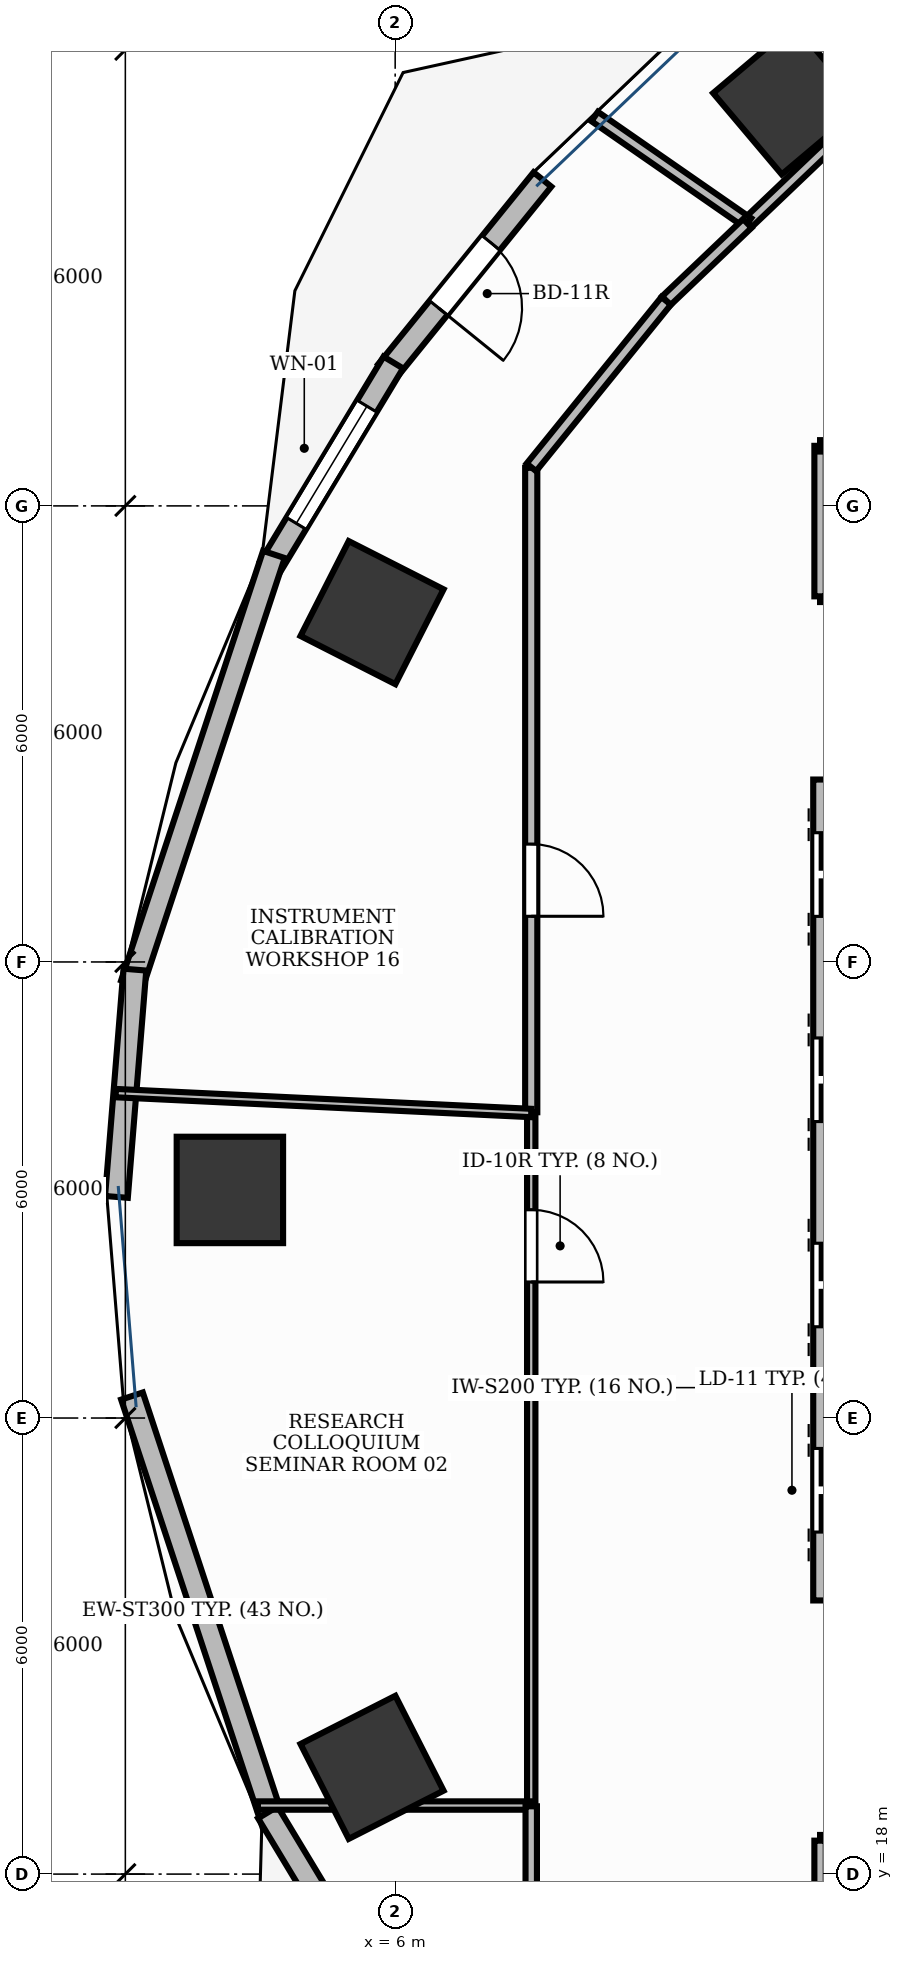
"""IFC4 building model, lengths in metres.
Left out: names, types, materials, properties, quantities, classifications, styles, units other than length and angle.
Written with IfcOpenShell. Run it as: python <this file> out.ifc"""

import sys

from ifc_helpers import new_model, si_unit, direction, frame, frame_2d, origin, origin_2d, place, context, subcontext, project, spatial, rectangle, extrude, element, fill, save


model = new_model("IFC4")
c1 = context("Model", 3, precision=1e-05, world=origin(), true_north=direction((0.0, 1.0)))
c2 = subcontext(c1, "Body", "Model", "MODEL_VIEW")
j1 = project(units=[si_unit("LENGTHUNIT", "METRE"), si_unit("PLANEANGLEUNIT", "RADIAN")], contexts=[c1])
p1 = place(None, origin())
s1 = spatial("IfcSite", under=j1, at=p1, CompositionType="ELEMENT")
p2 = place(p1, origin())
s2 = spatial("IfcBuilding", under=s1, at=p2, CompositionType="ELEMENT")
p3 = place(p2, frame((0.0, 0.0, 30.0)))
s3 = spatial("IfcBuildingStorey", under=s2, at=p3, CompositionType="ELEMENT", Elevation=30.0)
for number, where, z_axis, x_axis in (
    (1, (11.17, 41.347, -0.0), (0.0, 0.0, 1.0), (0.764, 0.645, 0.0)),
    (2, (5.696, 34.596, -0.0), (0.0, 0.0, 1.0), (0.453, 0.891, 0.0)),
    (3, (3.825, 27.001, -0.0), (0.0, 0.0, 1.0), (0.0, 1.0, 0.0)),
    (4, (5.696, 19.404, -0.0), (0.0, 0.0, 1.0), (-0.453, 0.891, 0.0)),
):
    element("IfcColumn", number, at=place(p3, frame(where, z_axis=z_axis, x_axis=x_axis)), inside=s3, PredefinedType="COLUMN", context=c2, shape_type="SweptSolid", body=[
        extrude(rectangle(XDim=1.4, YDim=1.4, at=origin_2d()), origin(), (0.0, 0.0, 1.0), 3.901),
    ])
p4 = place(p3, frame((7.938, 40.294, 0.0), z_axis=(0.0, 0.0, 1.0), x_axis=(-0.629295540187, -0.777166084631, 0.0)))
e5 = element("IfcWall", 5, at=p4, inside=s3, PredefinedType="STANDARD", context=c2, shape_type="SweptSolid", body=[
    extrude(rectangle(XDim=3.248, YDim=0.3, at=frame_2d((1.624, 0.0))), origin(), (0.0, 0.0, 1.0), 3.9),
])
p5 = place(p4, frame((1.074, 0.0, 0.0)))
e6 = element("IfcOpeningElement", 6, at=p5, cuts=e5, PredefinedType="OPENING", context=c2, shape_type="SweptSolid", body=[
    extrude(rectangle(XDim=1.1, YDim=2.15, at=frame_2d((0.55, 1.075))), frame((0.0, 0.165, 0.0), z_axis=(0.0, -1.0, 0.0), x_axis=(1.0, 0.0, 0.0)), (0.0, 0.0, 1.0), 0.33),
])
p6 = place(p3, frame((5.975, 37.886, 0.0), z_axis=(0.0, 0.0, 1.0), x_axis=(-0.516447962267, -0.856318575222, 0.0)))
e7 = element("IfcWall", 7, at=p6, inside=s3, PredefinedType="STANDARD", context=c2, shape_type="SweptSolid", body=[
    extrude(rectangle(XDim=3.143, YDim=0.3, at=frame_2d((1.571, 0.0))), origin(), (0.0, 0.0, 1.0), 3.9),
])
p7 = place(p6, frame((0.671, 0.0, 0.9)))
e8 = element("IfcOpeningElement", 8, at=p7, cuts=e7, PredefinedType="OPENING", context=c2, shape_type="SweptSolid", body=[
    extrude(rectangle(XDim=1.8, YDim=2.1, at=frame_2d((0.9, 1.05))), frame((0.0, 0.165, 0.0), z_axis=(0.0, -1.0, 0.0), x_axis=(1.0, 0.0, 0.0)), (0.0, 0.0, 1.0), 0.33),
])
p8 = place(p3, frame((4.404, 35.361, 0.0), z_axis=(0.0, 0.0, 1.0), x_axis=(-0.31372816724, -0.949512841978, 0.0)))
e9 = element("IfcWall", 9, at=p8, inside=s3, PredefinedType="STANDARD", context=c2, shape_type="SweptSolid", body=[
    extrude(rectangle(XDim=5.951, YDim=0.3, at=frame_2d((2.976, 0.0))), origin(), (0.0, 0.0, 1.0), 3.47),
])
p9 = place(p3, frame((2.576, 29.899, 0.0), z_axis=(0.0, 0.0, 1.0), x_axis=(-0.080890160317, -0.996723021689, 0.0)))
e10 = element("IfcWall", 10, at=p9, inside=s3, PredefinedType="STANDARD", context=c2, shape_type="SweptSolid", body=[
    extrude(rectangle(XDim=3.0, YDim=0.3, at=frame_2d((1.5, 0.0))), origin(), (0.0, 0.0, 1.0), 3.47),
])
p10 = place(p3, frame((2.537, 24.289, 0.0), z_axis=(0.0, 0.0, 1.0), x_axis=(0.31372816724, -0.949512841978, 0.0)))
e11 = element("IfcWall", 11, at=p10, inside=s3, PredefinedType="STANDARD", context=c2, shape_type="SweptSolid", body=[
    extrude(rectangle(XDim=5.951, YDim=0.3, at=frame_2d((2.976, 0.0))), origin(), (0.0, 0.0, 1.0), 3.9),
])
p11 = place(p3, frame((4.325, 18.812, 0.0), z_axis=(0.0, 0.0, 1.0), x_axis=(0.516423528484, -0.856333310825, 0.0)))
e12 = element("IfcWall", 12, at=p11, inside=s3, PredefinedType="STANDARD", context=c2, shape_type="SweptSolid", body=[
    extrude(rectangle(XDim=3.183, YDim=0.3, at=frame_2d((1.591, 0.0))), origin(), (0.0, 0.0, 1.0), 3.9),
])
p12 = place(p3, frame((11.6, 21.6, 0.0), z_axis=(0.0, 0.0, 1.0), x_axis=(0.0, 1.0, 0.0)))
e13 = element("IfcWall", 13, at=p12, inside=s3, PredefinedType="PARTITIONING", context=c2, shape_type="SweptSolid", body=[
    extrude(rectangle(XDim=10.8, YDim=0.2, at=frame_2d((5.4, 0.0))), origin(), (0.0, 0.0, 1.0), 2.91),
])
p13 = place(p12, frame((0.9, 0.0, 0.0)))
e14 = element("IfcOpeningElement", 14, at=p13, cuts=e13, PredefinedType="OPENING", context=c2, shape_type="SweptSolid", body=[
    extrude(rectangle(XDim=1.1, YDim=2.2, at=frame_2d((0.55, 1.1))), frame((0.0, 0.115, 0.0), z_axis=(0.0, -1.0, 0.0), x_axis=(1.0, 0.0, 0.0)), (0.0, 0.0, 1.0), 0.23),
])
p14 = place(p12, frame((3.6, 0.0, 0.0)))
e15 = element("IfcOpeningElement", 15, at=p14, cuts=e13, PredefinedType="OPENING", context=c2, shape_type="SweptSolid", body=[
    extrude(rectangle(XDim=1.1, YDim=2.2, at=frame_2d((0.55, 1.1))), frame((0.0, 0.115, 0.0), z_axis=(0.0, -1.0, 0.0), x_axis=(1.0, 0.0, 0.0)), (0.0, 0.0, 1.0), 0.23),
])
p15 = place(p12, frame((6.3, 0.0, 0.0)))
e16 = element("IfcOpeningElement", 16, at=p15, cuts=e13, PredefinedType="OPENING", context=c2, shape_type="SweptSolid", body=[
    extrude(rectangle(XDim=1.1, YDim=2.2, at=frame_2d((0.55, 1.1))), frame((0.0, 0.115, 0.0), z_axis=(0.0, -1.0, 0.0), x_axis=(1.0, 0.0, 0.0)), (0.0, 0.0, 1.0), 0.23),
])
p16 = place(p12, frame((9.0, 0.0, 0.0)))
e17 = element("IfcOpeningElement", 17, at=p16, cuts=e13, PredefinedType="OPENING", context=c2, shape_type="SweptSolid", body=[
    extrude(rectangle(XDim=1.1, YDim=2.2, at=frame_2d((0.55, 1.1))), frame((0.0, 0.115, 0.0), z_axis=(0.0, -1.0, 0.0), x_axis=(1.0, 0.0, 0.0)), (0.0, 0.0, 1.0), 0.23),
])
p17 = place(p3, frame((7.79, 28.013, 0.0), z_axis=(0.0, 0.0, 1.0), x_axis=(0.0, -1.0, 0.0)))
e18 = element("IfcWall", 18, at=p17, inside=s3, PredefinedType="MOVABLE", context=c2, shape_type="SweptSolid", body=[
    extrude(rectangle(XDim=9.111, YDim=0.11, at=frame_2d((4.555, 0.0))), origin(), (0.0, 0.0, 1.0), 2.91),
])
p18 = place(p17, frame((1.273, 0.0, 0.0)))
e19 = element("IfcOpeningElement", 19, at=p18, cuts=e18, PredefinedType="OPENING", context=c2, shape_type="SweptSolid", body=[
    extrude(rectangle(XDim=0.95, YDim=2.15, at=frame_2d((0.475, 1.075))), frame((0.0, 0.07, 0.0), z_axis=(0.0, -1.0, 0.0), x_axis=(1.0, 0.0, 0.0)), (0.0, 0.0, 1.0), 0.14),
])
p19 = place(p3, frame((11.59, 18.44, 0.0), z_axis=(0.0, 0.0, 1.0), x_axis=(1.0, 0.0, 0.0)))
e20 = element("IfcWall", 20, at=p19, inside=s3, PredefinedType="PARTITIONING", context=c2, shape_type="SweptSolid", body=[
    extrude(rectangle(XDim=5.411, YDim=0.15, at=frame_2d((2.706, 0.0))), origin(), (0.0, 0.0, 1.0), 2.91),
])
p20 = place(p19, frame((0.24, 0.0, 0.0)))
e21 = element("IfcOpeningElement", 21, at=p20, cuts=e20, PredefinedType="OPENING", context=c2, shape_type="SweptSolid", body=[
    extrude(rectangle(XDim=0.95, YDim=2.15, at=frame_2d((0.475, 1.075))), frame((0.0, 0.09, 0.0), z_axis=(0.0, -1.0, 0.0), x_axis=(1.0, 0.0, 0.0)), (0.0, 0.0, 1.0), 0.18),
])
p21 = place(p3, frame((21.74, 34.81, 0.0), z_axis=(0.0, 0.0, 1.0), x_axis=(-1.0, 0.0, 0.0)))
e22 = element("IfcWall", 22, at=p21, inside=s3, PredefinedType="PARTITIONING", context=c2, shape_type="SweptSolid", body=[
    extrude(rectangle(XDim=10.15, YDim=0.15, at=frame_2d((5.075, 0.0))), origin(), (0.0, 0.0, 1.0), 2.91),
])
p22 = place(p21, frame((8.96, 0.0, 0.0)))
e23 = element("IfcOpeningElement", 23, at=p22, cuts=e22, PredefinedType="OPENING", context=c2, shape_type="SweptSolid", body=[
    extrude(rectangle(XDim=0.95, YDim=2.15, at=frame_2d((0.475, 1.075))), frame((0.0, 0.09, 0.0), z_axis=(0.0, -1.0, 0.0), x_axis=(1.0, 0.0, 0.0)), (0.0, 0.0, 1.0), 0.18),
])
p23 = place(p3, frame((7.79, 36.501, 0.0), z_axis=(0.0, 0.0, 1.0), x_axis=(0.0, -1.0, 0.0)))
e24 = element("IfcWall", 24, at=p23, inside=s3, PredefinedType="PARTITIONING", context=c2, shape_type="SweptSolid", body=[
    extrude(rectangle(XDim=8.478, YDim=0.16, at=frame_2d((4.239, 0.0))), origin(), (0.0, 0.0, 1.0), 2.91),
])
p24 = place(p23, frame((4.95, 0.0, 0.0)))
e25 = element("IfcOpeningElement", 25, at=p24, cuts=e24, PredefinedType="OPENING", context=c2, shape_type="SweptSolid", body=[
    extrude(rectangle(XDim=0.95, YDim=2.15, at=frame_2d((0.475, 1.075))), frame((0.0, 0.095, 0.0), z_axis=(0.0, -1.0, 0.0), x_axis=(1.0, 0.0, 0.0)), (0.0, 0.0, 1.0), 0.19),
])
p25 = place(p3, frame((2.323, 28.275, 0.0), z_axis=(0.0, 0.0, 1.0), x_axis=(0.998855892644, -0.047821603185, 0.0)))
e26 = element("IfcWall", 26, at=p25, inside=s3, PredefinedType="MOVABLE", context=c2, shape_type="SweptSolid", body=[
    extrude(rectangle(XDim=5.473, YDim=0.11, at=frame_2d((2.736, 0.0))), origin(), (0.0, 0.0, 1.0), 2.91),
])
p26 = place(p3, frame((7.79, 18.902, 0.0), z_axis=(0.0, 0.0, 1.0), x_axis=(-1.0, 0.0, 0.0)))
e27 = element("IfcWall", 27, at=p26, inside=s3, PredefinedType="MOVABLE", context=c2, shape_type="SweptSolid", body=[
    extrude(rectangle(XDim=3.596, YDim=0.11, at=frame_2d((1.798, 0.0))), origin(), (0.0, 0.0, 1.0), 2.91),
])
p27 = place(p3, frame((7.79, 18.892, 0.0), z_axis=(0.0, 0.0, 1.0), x_axis=(0.0, -1.0, 0.0)))
e28 = element("IfcWall", 28, at=p27, inside=s3, PredefinedType="PARTITIONING", context=c2, shape_type="SweptSolid", body=[
    extrude(rectangle(XDim=1.393, YDim=0.15, at=frame_2d((0.697, 0.0))), origin(), (0.0, 0.0, 1.0), 2.91),
])
p28 = place(p3, frame((11.59, 16.5, 0.0), z_axis=(0.0, 0.0, 1.0), x_axis=(0.0, 1.0, 0.0)))
e29 = element("IfcWall", 29, at=p28, inside=s3, PredefinedType="PARTITIONING", context=c2, shape_type="SweptSolid", body=[
    extrude(rectangle(XDim=1.94, YDim=0.15, at=frame_2d((0.97, 0.0))), origin(), (0.0, 0.0, 1.0), 2.91),
])
p29 = place(p3, frame((17.001, 18.44, 0.0), z_axis=(0.0, 0.0, 1.0), x_axis=(-0.813397935838, -0.581707656796, 0.0)))
e30 = element("IfcWall", 30, at=p29, inside=s3, PredefinedType="PARTITIONING", context=c2, shape_type="SweptSolid", body=[
    extrude(rectangle(XDim=9.984, YDim=0.15, at=frame_2d((4.992, 0.0))), origin(), (0.0, 0.0, 1.0), 2.91),
])
p30 = place(p3, frame((11.693, 40.727, 0.0), z_axis=(0.0, 0.0, 1.0), x_axis=(-0.723614682185, -0.690204166697, 0.0)))
e31 = element("IfcWall", 31, at=p30, inside=s3, PredefinedType="PARTITIONING", context=c2, shape_type="SweptSolid", body=[
    extrude(rectangle(XDim=1.454, YDim=0.15, at=frame_2d((0.727, 0.0))), origin(), (0.0, 0.0, 1.0), 2.91),
])
p31 = place(p3, frame((10.641, 39.723, 0.0), z_axis=(0.0, 0.0, 1.0), x_axis=(-0.821561492386, 0.570119912149, 0.0)))
e32 = element("IfcWall", 32, at=p31, inside=s3, PredefinedType="PARTITIONING", context=c2, shape_type="SweptSolid", body=[
    extrude(rectangle(XDim=2.455, YDim=0.15, at=frame_2d((1.227, 0.0))), origin(), (0.0, 0.0, 1.0), 2.91),
])
p32 = place(p3, frame((11.59, 34.81, 0.0), z_axis=(0.0, 0.0, 1.0), x_axis=(0.0, 1.0, 0.0)))
e33 = element("IfcWall", 33, at=p32, inside=s3, PredefinedType="PARTITIONING", context=c2, shape_type="SweptSolid", body=[
    extrude(rectangle(XDim=1.98, YDim=0.15, at=frame_2d((0.99, 0.0))), origin(), (0.0, 0.0, 1.0), 2.91),
])
p33 = place(p3, frame((11.59, 36.79, 0.0), z_axis=(0.0, 0.0, 1.0), x_axis=(1.0, 0.0, 0.0)))
e34 = element("IfcWall", 34, at=p33, inside=s3, PredefinedType="PARTITIONING", context=c2, shape_type="SweptSolid", body=[
    extrude(rectangle(XDim=5.21, YDim=0.15, at=frame_2d((2.605, 0.0))), origin(), (0.0, 0.0, 1.0), 2.91),
])
p34 = place(p3, frame((10.634, 39.717, 0.0), z_axis=(0.0, 0.0, 1.0), x_axis=(-0.723701031319, -0.690113626345, 0.0)))
e35 = element("IfcWall", 35, at=p34, inside=s3, PredefinedType="PARTITIONING", context=c2, shape_type="SweptSolid", body=[
    extrude(rectangle(XDim=1.476, YDim=0.16, at=frame_2d((0.738, 0.0))), origin(), (0.0, 0.0, 1.0), 2.91),
])
p35 = place(p3, frame((9.565, 38.697, 0.0), z_axis=(0.0, 0.0, 1.0), x_axis=(-0.629270515505, -0.777186347227, 0.0)))
e36 = element("IfcWall", 36, at=p35, inside=s3, PredefinedType="PARTITIONING", context=c2, shape_type="SweptSolid", body=[
    extrude(rectangle(XDim=2.817, YDim=0.16, at=frame_2d((1.409, 0.0))), origin(), (0.0, 0.0, 1.0), 2.91),
])
p36 = place(p5, origin())
e37 = element("IfcDoor", 37, at=p36, inside=s3, OperationType="SINGLE_SWING_RIGHT", PredefinedType="DOOR", context=c2, shape_type="SweptSolid", body=[
    extrude(rectangle(XDim=1.1, YDim=2.15, at=frame_2d((0.55, 1.075))), frame((0.0, 0.025, 0.0), z_axis=(0.0, -1.0, 0.0), x_axis=(1.0, 0.0, 0.0)), (0.0, 0.0, 1.0), 0.05),
])
fill(e6, e37)
p37 = place(p7, origin())
e38 = element("IfcWindow", 38, at=p37, inside=s3, PartitioningType="SINGLE_PANEL", PredefinedType="WINDOW", context=c2, shape_type="SweptSolid", body=[
    extrude(rectangle(XDim=1.8, YDim=2.1, at=frame_2d((0.9, 1.05))), frame((0.0, 0.03, 0.0), z_axis=(0.0, -1.0, 0.0), x_axis=(1.0, 0.0, 0.0)), (0.0, 0.0, 1.0), 0.06),
])
fill(e8, e38)
p38 = place(p13, origin())
e39 = element("IfcDoor", 39, at=p38, inside=s3, OperationType="DOUBLE_DOOR_SLIDING", PredefinedType="DOOR", context=c2, shape_type="SweptSolid", body=[
    extrude(rectangle(XDim=1.1, YDim=2.2, at=frame_2d((0.55, 1.1))), frame((0.0, 0.025, 0.0), z_axis=(0.0, -1.0, 0.0), x_axis=(1.0, 0.0, 0.0)), (0.0, 0.0, 1.0), 0.05),
])
fill(e14, e39)
p39 = place(p14, origin())
e40 = element("IfcDoor", 40, at=p39, inside=s3, OperationType="DOUBLE_DOOR_SLIDING", PredefinedType="DOOR", context=c2, shape_type="SweptSolid", body=[
    extrude(rectangle(XDim=1.1, YDim=2.2, at=frame_2d((0.55, 1.1))), frame((0.0, 0.025, 0.0), z_axis=(0.0, -1.0, 0.0), x_axis=(1.0, 0.0, 0.0)), (0.0, 0.0, 1.0), 0.05),
])
fill(e15, e40)
p40 = place(p15, origin())
e41 = element("IfcDoor", 41, at=p40, inside=s3, OperationType="DOUBLE_DOOR_SLIDING", PredefinedType="DOOR", context=c2, shape_type="SweptSolid", body=[
    extrude(rectangle(XDim=1.1, YDim=2.2, at=frame_2d((0.55, 1.1))), frame((0.0, 0.025, 0.0), z_axis=(0.0, -1.0, 0.0), x_axis=(1.0, 0.0, 0.0)), (0.0, 0.0, 1.0), 0.05),
])
fill(e16, e41)
p41 = place(p16, origin())
e42 = element("IfcDoor", 42, at=p41, inside=s3, OperationType="DOUBLE_DOOR_SLIDING", PredefinedType="DOOR", context=c2, shape_type="SweptSolid", body=[
    extrude(rectangle(XDim=1.1, YDim=2.2, at=frame_2d((0.55, 1.1))), frame((0.0, 0.025, 0.0), z_axis=(0.0, -1.0, 0.0), x_axis=(1.0, 0.0, 0.0)), (0.0, 0.0, 1.0), 0.05),
])
fill(e17, e42)
p42 = place(p18, origin())
e43 = element("IfcDoor", 43, at=p42, inside=s3, OperationType="SINGLE_SWING_RIGHT", PredefinedType="DOOR", context=c2, shape_type="SweptSolid", body=[
    extrude(rectangle(XDim=0.95, YDim=2.15, at=frame_2d((0.475, 1.075))), frame((0.0, 0.025, 0.0), z_axis=(0.0, -1.0, 0.0), x_axis=(1.0, 0.0, 0.0)), (0.0, 0.0, 1.0), 0.05),
])
fill(e19, e43)
p43 = place(p24, origin())
e44 = element("IfcDoor", 44, at=p43, inside=s3, OperationType="SINGLE_SWING_RIGHT", PredefinedType="DOOR", context=c2, shape_type="SweptSolid", body=[
    extrude(rectangle(XDim=0.95, YDim=2.15, at=frame_2d((0.475, 1.075))), frame((0.0, 0.025, 0.0), z_axis=(0.0, -1.0, 0.0), x_axis=(1.0, 0.0, 0.0)), (0.0, 0.0, 1.0), 0.05),
])
fill(e25, e44)
save(model, sys.argv[1])
